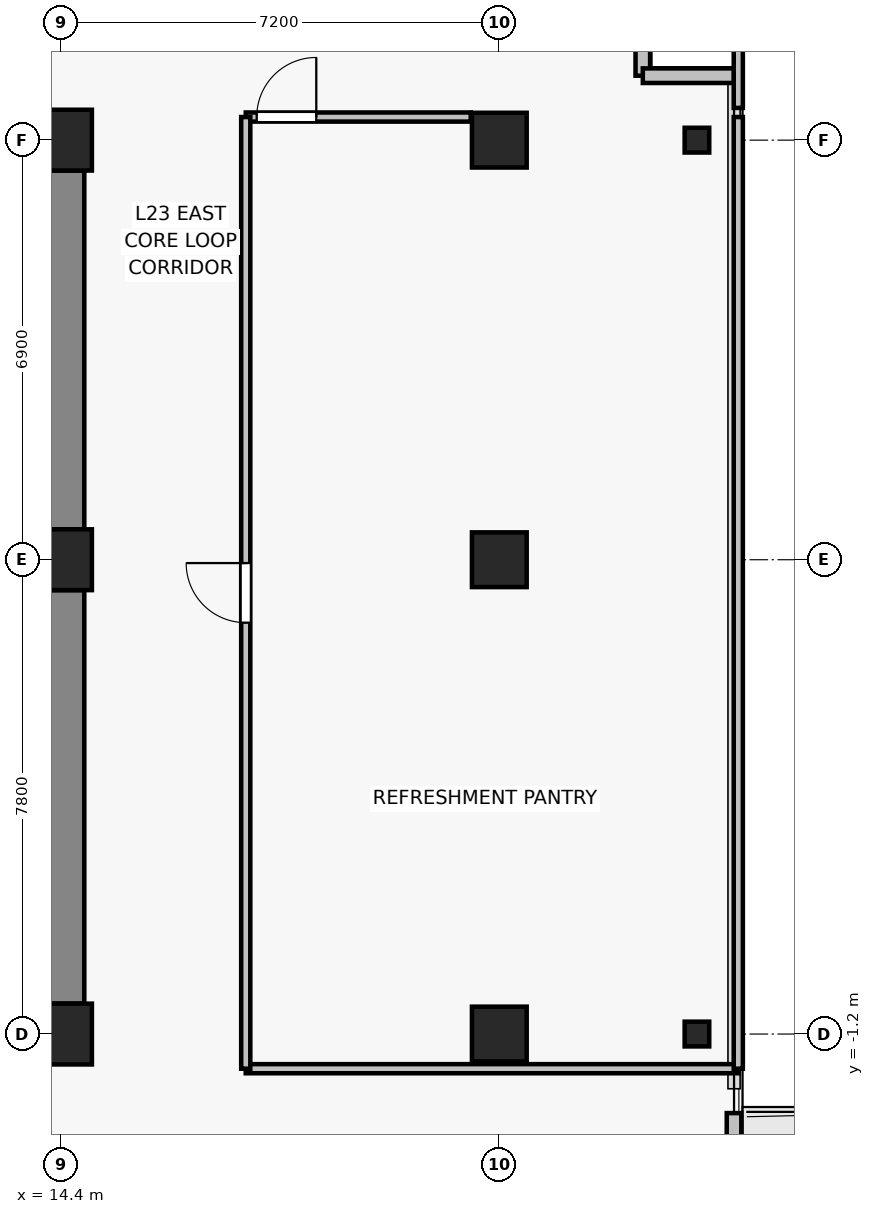
"""IFC4 building model, lengths in metres.
Left out: names, types, materials, properties, quantities, classifications, styles, units other than length and angle.
Written with IfcOpenShell. Run it as: python <this file> out.ifc"""

import sys

from ifc_helpers import new_model, si_unit, direction, frame, frame_2d, origin, origin_2d, place, context, subcontext, project, spatial, rectangle, i_section, extrude, source, transform, mapped, element, fill, save


model = new_model("IFC4")
c1 = context("Model", 3, precision=1e-05, world=origin(), true_north=direction((0.0, 1.0)))
c2 = subcontext(c1, "Body", "Model", "MODEL_VIEW")
j1 = project(units=[si_unit("LENGTHUNIT", "METRE"), si_unit("PLANEANGLEUNIT", "RADIAN")], contexts=[c1])
p1 = place(None, origin())
s1 = spatial("IfcSite", under=j1, at=p1, CompositionType="ELEMENT")
p2 = place(p1, origin())
s2 = spatial("IfcBuilding", under=s1, at=p2, CompositionType="ELEMENT")
p3 = place(p2, frame((0.0, 0.0, 86.8)))
s3 = spatial("IfcBuildingStorey", under=s2, at=p3, CompositionType="ELEMENT", Elevation=86.8)
for number, where, z_axis, x_axis in (
    (1, (14.4, -1.2, 0.0), (0.0, 0.0, 1.0), (1.0, 0.0, 0.0)),
    (2, (14.4, 6.6, 0.0), (0.0, 0.0, 1.0), (1.0, 0.0, 0.0)),
    (3, (14.4, 13.5, 0.0), (0.0, 0.0, 1.0), (1.0, 0.0, 0.0)),
):
    element("IfcColumn", number, at=place(p3, frame(where, z_axis=z_axis, x_axis=x_axis)), inside=s3, PredefinedType="COLUMN", context=c2, shape_type="SweptSolid", body=[
        extrude(rectangle(XDim=1.0, YDim=1.0, at=origin_2d()), origin(), (0.0, 0.0, 1.0), 3.3),
    ])
for number, where, z_axis, x_axis in (
    (4, (21.6, -1.2, 0.0), (0.0, 0.0, 1.0), (1.0, 0.0, 0.0)),
    (5, (21.6, 6.6, 0.0), (0.0, 0.0, 1.0), (1.0, 0.0, 0.0)),
    (6, (21.6, 13.5, 0.0), (0.0, 0.0, 1.0), (1.0, 0.0, 0.0)),
):
    element("IfcColumn", number, at=place(p3, frame(where, z_axis=z_axis, x_axis=x_axis)), inside=s3, PredefinedType="COLUMN", context=c2, shape_type="SweptSolid", body=[
        extrude(rectangle(XDim=0.9, YDim=0.9, at=origin_2d()), origin(), (0.0, 0.0, 1.0), 3.3),
    ])
for number, where, z_axis, x_axis in (
    (7, (24.85, -1.2, 0.0), (0.0, 0.0, 1.0), (1.0, 0.0, 0.0)),
    (8, (24.85, 13.5, 0.0), (0.0, 0.0, 1.0), (1.0, 0.0, 0.0)),
):
    element("IfcColumn", number, at=place(p3, frame(where, z_axis=z_axis, x_axis=x_axis)), inside=s3, PredefinedType="COLUMN", context=c2, shape_type="SweptSolid", body=[
        extrude(i_section(OverallWidth=0.404, OverallDepth=0.407, WebThickness=0.022, FlangeThickness=0.032, FilletRadius=0.015, at=origin_2d()), origin(), (0.0, 0.0, 1.0), 3.3),
    ])
p4 = place(p3, frame((14.4, -0.7, 0.0), z_axis=(0.0, 0.0, 1.0), x_axis=(0.0, 1.0, 0.0)))
e9 = element("IfcWall", 9, at=p4, inside=s3, PredefinedType="SHEAR", context=c2, shape_type="SweptSolid", body=[
    extrude(rectangle(XDim=6.8, YDim=0.75, at=frame_2d((3.4, 0.0))), origin(), (0.0, 0.0, 1.0), 3.075),
])
p5 = place(p3, frame((14.4, 7.1, 0.0), z_axis=(0.0, 0.0, 1.0), x_axis=(0.0, 1.0, 0.0)))
e10 = element("IfcWall", 10, at=p5, inside=s3, PredefinedType="SHEAR", context=c2, shape_type="SweptSolid", body=[
    extrude(rectangle(XDim=5.9, YDim=0.75, at=frame_2d((2.95, 0.0))), origin(), (0.0, 0.0, 1.0), 3.075),
])
p6 = place(p3, frame((25.46, -2.5, 0.0), z_axis=(0.0, 0.0, 1.0), x_axis=(0.0, -1.0, 0.0)))
e11 = element("IfcWall", 11, at=p6, inside=s3, PredefinedType="SOLIDWALL", context=c2, shape_type="SweptSolid", body=[
    extrude(rectangle(XDim=5.8, YDim=0.24, at=frame_2d((2.9, 0.0))), origin(), (0.0, 0.0, 1.0), 3.075),
])
p7 = place(p6, frame((1.566, 0.0, 0.0)))
e12 = element("IfcOpeningElement", 12, at=p7, cuts=e11, PredefinedType="OPENING", context=c2, shape_type="SweptSolid", body=[
    extrude(rectangle(XDim=1.0, YDim=2.2, at=frame_2d((0.5, 1.1))), frame((0.0, 0.13, 0.0), z_axis=(0.0, -1.0, 0.0), x_axis=(1.0, 0.0, 0.0)), (0.0, 0.0, 1.0), 0.26),
])
p8 = place(p6, frame((2.916, 0.0, 0.85)))
e13 = element("IfcOpeningElement", 13, at=p8, cuts=e11, PredefinedType="OPENING", context=c2, shape_type="SweptSolid", body=[
    extrude(rectangle(XDim=0.9, YDim=1.35, at=frame_2d((0.45, 0.675))), frame((0.0, 0.13, 0.0), z_axis=(0.0, -1.0, 0.0), x_axis=(1.0, 0.0, 0.0)), (0.0, 0.0, 1.0), 0.26),
])
for number, where, z_axis, x_axis in (
    (14, (23.96, 14.56, 0.0), (0.0, 0.0, 1.0), (0.0, 1.0, 0.0)),
    (15, (25.46, 14.56, 0.0), (0.0, 0.0, 1.0), (-1.0, 0.0, 0.0)),
):
    element("IfcWall", number, at=place(p3, frame(where, z_axis=z_axis, x_axis=x_axis)), inside=s3, PredefinedType="SOLIDWALL", context=c2, shape_type="SweptSolid", body=[
        extrude(rectangle(XDim=1.5, YDim=0.24, at=frame_2d((0.75, 0.0))), origin(), (0.0, 0.0, 1.0), 3.075),
    ])
p9 = place(p3, frame((25.53, -1.77, 0.0), z_axis=(0.0, 0.0, 1.0), x_axis=(-1.0, 0.0, 0.0)))
e16 = element("IfcWall", 16, at=p9, inside=s3, PredefinedType="PARTITIONING", context=c2, shape_type="SweptSolid", body=[
    extrude(rectangle(XDim=8.1, YDim=0.15, at=frame_2d((4.05, 0.0))), origin(), (0.0, 0.0, 1.0), 2.515),
])
p10 = place(p3, frame((17.43, 13.88, 0.0), z_axis=(0.0, 0.0, 1.0), x_axis=(1.0, 0.0, 0.0)))
e17 = element("IfcWall", 17, at=p10, inside=s3, PredefinedType="PARTITIONING", context=c2, shape_type="SweptSolid", body=[
    extrude(rectangle(XDim=3.7, YDim=0.15, at=frame_2d((1.85, 0.0))), origin(), (0.0, 0.0, 1.0), 3.075),
])
p11 = place(p10, frame((0.18, 0.0, 0.0)))
e18 = element("IfcOpeningElement", 18, at=p11, cuts=e17, PredefinedType="OPENING", context=c2, shape_type="SweptSolid", body=[
    extrude(rectangle(XDim=0.98, YDim=2.15, at=frame_2d((0.49, 1.075))), frame((0.0, 0.085, 0.0), z_axis=(0.0, -1.0, 0.0), x_axis=(1.0, 0.0, 0.0)), (0.0, 0.0, 1.0), 0.17),
])
p12 = place(p3, frame((17.43, -1.77, 0.0), z_axis=(0.0, 0.0, 1.0), x_axis=(0.0, 1.0, 0.0)))
e19 = element("IfcWall", 19, at=p12, inside=s3, PredefinedType="PARTITIONING", context=c2, shape_type="SweptSolid", body=[
    extrude(rectangle(XDim=15.65, YDim=0.15, at=frame_2d((7.825, 0.0))), origin(), (0.0, 0.0, 1.0), 2.515),
])
p13 = place(p12, frame((7.335, 0.0, 0.0)))
e20 = element("IfcOpeningElement", 20, at=p13, cuts=e19, PredefinedType="OPENING", context=c2, shape_type="SweptSolid", body=[
    extrude(rectangle(XDim=0.98, YDim=2.15, at=frame_2d((0.49, 1.075))), frame((0.0, 0.085, 0.0), z_axis=(0.0, -1.0, 0.0), x_axis=(1.0, 0.0, 0.0)), (0.0, 0.0, 1.0), 0.17),
])
p14 = place(p3, frame((25.53, 13.88, 0.0), z_axis=(0.0, 0.0, 1.0), x_axis=(0.0, -1.0, 0.0)))
e21 = element("IfcWall", 21, at=p14, inside=s3, PredefinedType="PARTITIONING", context=c2, shape_type="SweptSolid", body=[
    extrude(rectangle(XDim=15.65, YDim=0.15, at=frame_2d((7.825, 0.0))), origin(), (0.0, 0.0, 1.0), 3.075),
])
p15 = place(p3, frame((25.53, 17.63, 0.0), z_axis=(0.0, 0.0, 1.0), x_axis=(0.0, -1.0, 0.0)))
e22 = element("IfcWall", 22, at=p15, inside=s3, PredefinedType="PARTITIONING", context=c2, shape_type="SweptSolid", body=[
    extrude(rectangle(XDim=3.6, YDim=0.15, at=frame_2d((1.8, 0.0))), origin(), (0.0, 0.0, 1.0), 3.075),
])
m1 = source(origin(), c2, "Body", "SweptSolid", [
    extrude(rectangle(XDim=0.98, YDim=2.15, at=frame_2d((0.49, 1.075))), frame((0.0, 0.025, 0.0), z_axis=(0.0, -1.0, 0.0), x_axis=(1.0, 0.0, 0.0)), (0.0, 0.0, 1.0), 0.05),
])
p16 = place(p13, origin())
e23 = element("IfcDoor", 23, at=p16, inside=s3, OperationType="SINGLE_SWING_RIGHT", PredefinedType="DOOR", context=c2, shape_type="MappedRepresentation", body=[
    mapped(m1, transform((0.0, 0.0, 0.0), x_axis=(1.0, 0.0, 0.0), y_axis=(0.0, 1.0, 0.0), z_axis=(0.0, 0.0, 1.0), scale=1.0)),
])
fill(e20, e23)
p17 = place(p11, origin())
e24 = element("IfcDoor", 24, at=p17, inside=s3, OperationType="SINGLE_SWING_RIGHT", PredefinedType="DOOR", context=c2, shape_type="MappedRepresentation", body=[
    mapped(m1, transform((0.0, 0.0, 0.0), x_axis=(1.0, 0.0, 0.0), y_axis=(0.0, 1.0, 0.0), z_axis=(0.0, 0.0, 1.0), scale=1.0)),
])
fill(e18, e24)
save(model, sys.argv[1])
